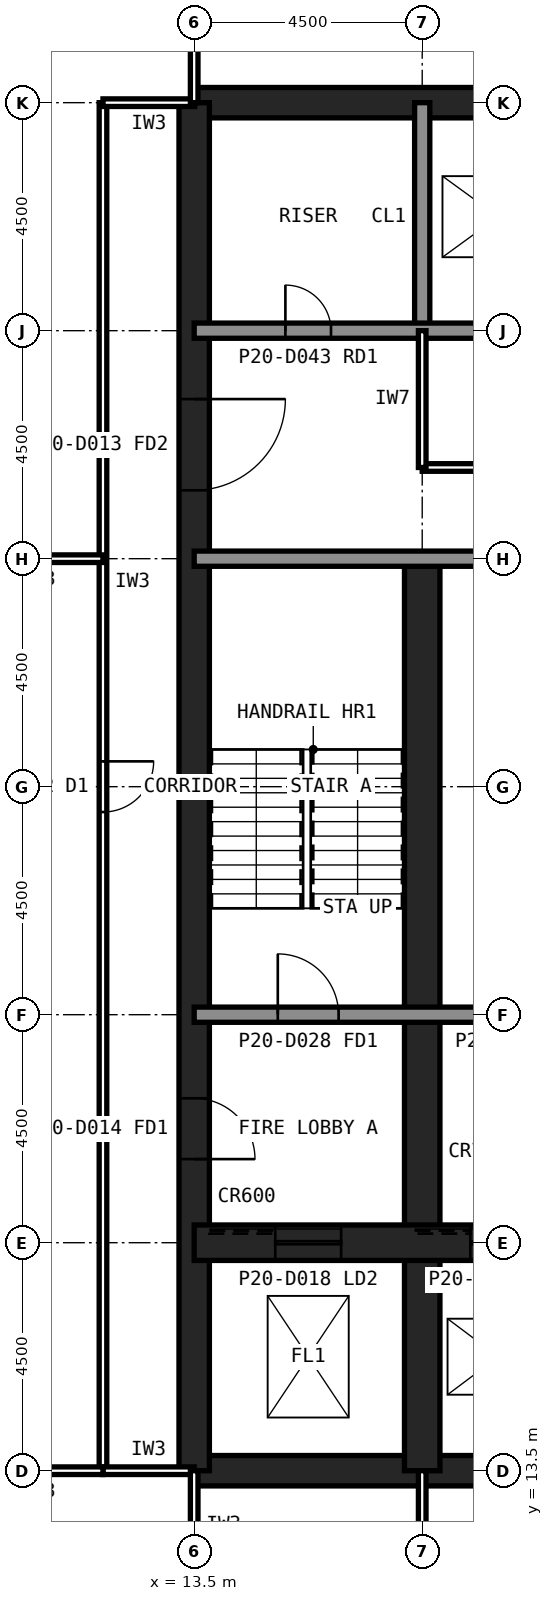
"""IFC4 building model, lengths in metres.
Left out: names, types, materials, properties, quantities, classifications, styles, units other than length and angle.
Written with IfcOpenShell. Run it as: python <this file> out.ifc"""

import sys

from ifc_helpers import new_model, si_unit, direction, frame, frame_2d, origin, place, context, subcontext, project, spatial, rectangle, extrude, element, fill, save


model = new_model("IFC4")
c1 = context("Model", 3, precision=1e-05, world=origin(), true_north=direction((0.0, 1.0)))
c2 = subcontext(c1, "Body", "Model", "MODEL_VIEW")
j1 = project(units=[si_unit("LENGTHUNIT", "METRE"), si_unit("PLANEANGLEUNIT", "RADIAN")], contexts=[c1])
p1 = place(None, origin())
s1 = spatial("IfcSite", under=j1, at=p1, CompositionType="ELEMENT")
p2 = place(p1, origin())
s2 = spatial("IfcBuilding", under=s1, at=p2, CompositionType="ELEMENT")
p3 = place(p2, frame((0.0, 0.0, 87.8)))
s3 = spatial("IfcBuildingStorey", under=s2, at=p3, CompositionType="ELEMENT", Elevation=87.8)
for number, where, z_axis, x_axis in (
    (1, (13.5, 13.5, 0.0), (0.0, 0.0, 1.0), (1.0, 0.0, 0.0)),
    (2, (40.5, 40.5, 0.0), (0.0, 0.0, 1.0), (-1.0, 0.0, 0.0)),
):
    element("IfcWall", number, at=place(p3, frame(where, z_axis=z_axis, x_axis=x_axis)), inside=s3, PredefinedType="SHEAR", context=c2, shape_type="SweptSolid", body=[
        extrude(rectangle(XDim=27.0, YDim=0.6, at=frame_2d((13.5, 0.0))), origin(), (0.0, 0.0, 1.0), 4.2),
    ])
p4 = place(p3, frame((13.5, 40.5, 0.0), z_axis=(0.0, 0.0, 1.0), x_axis=(0.0, -1.0, 0.0)))
e3 = element("IfcWall", 3, at=p4, inside=s3, PredefinedType="SHEAR", context=c2, shape_type="SweptSolid", body=[
    extrude(rectangle(XDim=27.0, YDim=0.6, at=frame_2d((13.5, 0.0))), origin(), (0.0, 0.0, 1.0), 4.2),
])
p5 = place(p4, frame((19.65, 0.0, 0.0)))
e4 = element("IfcOpeningElement", 4, at=p5, cuts=e3, PredefinedType="OPENING", context=c2, shape_type="SweptSolid", body=[
    extrude(rectangle(XDim=1.2, YDim=2.1, at=frame_2d((0.6, 1.05))), frame((0.0, 0.31, 0.0), z_axis=(0.0, -1.0, 0.0), x_axis=(1.0, 0.0, 0.0)), (0.0, 0.0, 1.0), 0.62),
])
p6 = place(p4, frame((5.85, 0.0, 0.0)))
e5 = element("IfcOpeningElement", 5, at=p6, cuts=e3, PredefinedType="OPENING", context=c2, shape_type="SweptSolid", body=[
    extrude(rectangle(XDim=1.8, YDim=2.1, at=frame_2d((0.9, 1.05))), frame((0.0, 0.31, 0.0), z_axis=(0.0, -1.0, 0.0), x_axis=(1.0, 0.0, 0.0)), (0.0, 0.0, 1.0), 0.62),
])
p7 = place(p3, frame((18.0, 13.5, 0.0), z_axis=(0.0, 0.0, 1.0), x_axis=(0.0, 1.0, 0.0)))
e6 = element("IfcWall", 6, at=p7, inside=s3, PredefinedType="SHEAR", context=c2, shape_type="SweptSolid", body=[
    extrude(rectangle(XDim=18.0, YDim=0.7, at=frame_2d((9.0, 0.0))), origin(), (0.0, 0.0, 1.0), 4.2),
])
p8 = place(p3, frame((18.0, 36.0, 0.0), z_axis=(0.0, 0.0, 1.0), x_axis=(0.0, 1.0, 0.0)))
e7 = element("IfcWall", 7, at=p8, inside=s3, PredefinedType="SOLIDWALL", context=c2, shape_type="SweptSolid", body=[
    extrude(rectangle(XDim=4.5, YDim=0.3, at=frame_2d((2.25, 0.0))), origin(), (0.0, 0.0, 1.0), 4.04),
])
p9 = place(p3, frame((13.5, 18.0, 0.0), z_axis=(0.0, 0.0, 1.0), x_axis=(1.0, 0.0, 0.0)))
e8 = element("IfcWall", 8, at=p9, inside=s3, PredefinedType="SHEAR", context=c2, shape_type="SweptSolid", body=[
    extrude(rectangle(XDim=27.0, YDim=0.7, at=frame_2d((13.5, 0.0))), origin(), (0.0, 0.0, 1.0), 4.2),
])
p10 = place(p9, frame((24.3, 0.0, 0.0)))
e9 = element("IfcOpeningElement", 9, at=p10, cuts=e8, PredefinedType="OPENING", context=c2, shape_type="SweptSolid", body=[
    extrude(rectangle(XDim=0.9, YDim=2.1, at=frame_2d((0.45, 1.05))), frame((0.0, 0.36, 0.0), z_axis=(0.0, -1.0, 0.0), x_axis=(1.0, 0.0, 0.0)), (0.0, 0.0, 1.0), 0.72),
])
p11 = place(p9, frame((5.45, 0.0, 0.0)))
e10 = element("IfcOpeningElement", 10, at=p11, cuts=e8, PredefinedType="OPENING", context=c2, shape_type="SweptSolid", body=[
    extrude(rectangle(XDim=1.1, YDim=2.1, at=frame_2d((0.55, 1.05))), frame((0.0, 0.36, 0.0), z_axis=(0.0, -1.0, 0.0), x_axis=(1.0, 0.0, 0.0)), (0.0, 0.0, 1.0), 0.72),
])
p12 = place(p9, frame((8.45, 0.0, 0.0)))
e11 = element("IfcOpeningElement", 11, at=p12, cuts=e8, PredefinedType="OPENING", context=c2, shape_type="SweptSolid", body=[
    extrude(rectangle(XDim=1.1, YDim=2.1, at=frame_2d((0.55, 1.05))), frame((0.0, 0.36, 0.0), z_axis=(0.0, -1.0, 0.0), x_axis=(1.0, 0.0, 0.0)), (0.0, 0.0, 1.0), 0.72),
])
p13 = place(p9, frame((11.45, 0.0, 0.0)))
e12 = element("IfcOpeningElement", 12, at=p13, cuts=e8, PredefinedType="OPENING", context=c2, shape_type="SweptSolid", body=[
    extrude(rectangle(XDim=1.1, YDim=2.1, at=frame_2d((0.55, 1.05))), frame((0.0, 0.36, 0.0), z_axis=(0.0, -1.0, 0.0), x_axis=(1.0, 0.0, 0.0)), (0.0, 0.0, 1.0), 0.72),
])
p14 = place(p9, frame((14.45, 0.0, 0.0)))
e13 = element("IfcOpeningElement", 13, at=p14, cuts=e8, PredefinedType="OPENING", context=c2, shape_type="SweptSolid", body=[
    extrude(rectangle(XDim=1.1, YDim=2.1, at=frame_2d((0.55, 1.05))), frame((0.0, 0.36, 0.0), z_axis=(0.0, -1.0, 0.0), x_axis=(1.0, 0.0, 0.0)), (0.0, 0.0, 1.0), 0.72),
])
p15 = place(p9, frame((17.45, 0.0, 0.0)))
e14 = element("IfcOpeningElement", 14, at=p15, cuts=e8, PredefinedType="OPENING", context=c2, shape_type="SweptSolid", body=[
    extrude(rectangle(XDim=1.1, YDim=2.1, at=frame_2d((0.55, 1.05))), frame((0.0, 0.36, 0.0), z_axis=(0.0, -1.0, 0.0), x_axis=(1.0, 0.0, 0.0)), (0.0, 0.0, 1.0), 0.72),
])
p16 = place(p9, frame((20.45, 0.0, 0.0)))
e15 = element("IfcOpeningElement", 15, at=p16, cuts=e8, PredefinedType="OPENING", context=c2, shape_type="SweptSolid", body=[
    extrude(rectangle(XDim=1.1, YDim=2.1, at=frame_2d((0.55, 1.05))), frame((0.0, 0.36, 0.0), z_axis=(0.0, -1.0, 0.0), x_axis=(1.0, 0.0, 0.0)), (0.0, 0.0, 1.0), 0.72),
])
p17 = place(p9, frame((1.6, 0.0, 0.0)))
e16 = element("IfcOpeningElement", 16, at=p17, cuts=e8, PredefinedType="OPENING", context=c2, shape_type="SweptSolid", body=[
    extrude(rectangle(XDim=1.3, YDim=2.2, at=frame_2d((0.65, 1.1))), frame((0.0, 0.36, 0.0), z_axis=(0.0, -1.0, 0.0), x_axis=(1.0, 0.0, 0.0)), (0.0, 0.0, 1.0), 0.72),
])
p18 = place(p3, frame((13.5, 36.0, 0.0), z_axis=(0.0, 0.0, 1.0), x_axis=(1.0, 0.0, 0.0)))
e17 = element("IfcWall", 17, at=p18, inside=s3, PredefinedType="SOLIDWALL", context=c2, shape_type="SweptSolid", body=[
    extrude(rectangle(XDim=27.0, YDim=0.3, at=frame_2d((13.5, 0.0))), origin(), (0.0, 0.0, 1.0), 4.04),
])
p19 = place(p18, frame((1.8, 0.0, 0.0)))
e18 = element("IfcOpeningElement", 18, at=p19, cuts=e17, PredefinedType="OPENING", context=c2, shape_type="SweptSolid", body=[
    extrude(rectangle(XDim=0.9, YDim=2.1, at=frame_2d((0.45, 1.05))), frame((0.0, 0.16, 0.0), z_axis=(0.0, -1.0, 0.0), x_axis=(1.0, 0.0, 0.0)), (0.0, 0.0, 1.0), 0.32),
])
p20 = place(p18, frame((24.1, 0.0, 0.0)))
e19 = element("IfcOpeningElement", 19, at=p20, cuts=e17, PredefinedType="OPENING", context=c2, shape_type="SweptSolid", body=[
    extrude(rectangle(XDim=1.3, YDim=2.2, at=frame_2d((0.65, 1.1))), frame((0.0, 0.16, 0.0), z_axis=(0.0, -1.0, 0.0), x_axis=(1.0, 0.0, 0.0)), (0.0, 0.0, 1.0), 0.32),
])
p21 = place(p3, frame((13.5, 22.5, 0.0), z_axis=(0.0, 0.0, 1.0), x_axis=(1.0, 0.0, 0.0)))
e20 = element("IfcWall", 20, at=p21, inside=s3, PredefinedType="SOLIDWALL", context=c2, shape_type="SweptSolid", body=[
    extrude(rectangle(XDim=27.0, YDim=0.3, at=frame_2d((13.5, 0.0))), origin(), (0.0, 0.0, 1.0), 4.04),
])
p22 = place(p21, frame((1.65, 0.0, 0.0)))
e21 = element("IfcOpeningElement", 21, at=p22, cuts=e20, PredefinedType="OPENING", context=c2, shape_type="SweptSolid", body=[
    extrude(rectangle(XDim=1.2, YDim=2.1, at=frame_2d((0.6, 1.05))), frame((0.0, 0.16, 0.0), z_axis=(0.0, -1.0, 0.0), x_axis=(1.0, 0.0, 0.0)), (0.0, 0.0, 1.0), 0.32),
])
p23 = place(p21, frame((6.025, 0.0, 0.0)))
e22 = element("IfcOpeningElement", 22, at=p23, cuts=e20, PredefinedType="OPENING", context=c2, shape_type="SweptSolid", body=[
    extrude(rectangle(XDim=1.0, YDim=2.1, at=frame_2d((0.5, 1.05))), frame((0.0, 0.16, 0.0), z_axis=(0.0, -1.0, 0.0), x_axis=(1.0, 0.0, 0.0)), (0.0, 0.0, 1.0), 0.32),
])
p24 = place(p21, frame((10.525, 0.0, 0.0)))
e23 = element("IfcOpeningElement", 23, at=p24, cuts=e20, PredefinedType="OPENING", context=c2, shape_type="SweptSolid", body=[
    extrude(rectangle(XDim=1.0, YDim=2.1, at=frame_2d((0.5, 1.05))), frame((0.0, 0.16, 0.0), z_axis=(0.0, -1.0, 0.0), x_axis=(1.0, 0.0, 0.0)), (0.0, 0.0, 1.0), 0.32),
])
p25 = place(p21, frame((19.75, 0.0, 0.0)))
e24 = element("IfcOpeningElement", 24, at=p25, cuts=e20, PredefinedType="OPENING", context=c2, shape_type="SweptSolid", body=[
    extrude(rectangle(XDim=1.0, YDim=2.1, at=frame_2d((0.5, 1.05))), frame((0.0, 0.16, 0.0), z_axis=(0.0, -1.0, 0.0), x_axis=(1.0, 0.0, 0.0)), (0.0, 0.0, 1.0), 0.32),
])
p26 = place(p21, frame((15.05, 0.0, 0.0)))
e25 = element("IfcOpeningElement", 25, at=p26, cuts=e20, PredefinedType="OPENING", context=c2, shape_type="SweptSolid", body=[
    extrude(rectangle(XDim=1.4, YDim=2.4, at=frame_2d((0.7, 1.2))), frame((0.0, 0.16, 0.0), z_axis=(0.0, -1.0, 0.0), x_axis=(1.0, 0.0, 0.0)), (0.0, 0.0, 1.0), 0.32),
])
p27 = place(p3, frame((13.5, 31.5, 0.0), z_axis=(0.0, 0.0, 1.0), x_axis=(1.0, 0.0, 0.0)))
e26 = element("IfcWall", 26, at=p27, inside=s3, PredefinedType="SOLIDWALL", context=c2, shape_type="SweptSolid", body=[
    extrude(rectangle(XDim=27.0, YDim=0.3, at=frame_2d((13.5, 0.0))), origin(), (0.0, 0.0, 1.0), 4.04),
])
p28 = place(p27, frame((24.15, 0.0, 0.0)))
e27 = element("IfcOpeningElement", 27, at=p28, cuts=e26, PredefinedType="OPENING", context=c2, shape_type="SweptSolid", body=[
    extrude(rectangle(XDim=1.2, YDim=2.1, at=frame_2d((0.6, 1.05))), frame((0.0, 0.16, 0.0), z_axis=(0.0, -1.0, 0.0), x_axis=(1.0, 0.0, 0.0)), (0.0, 0.0, 1.0), 0.32),
])
p29 = place(p27, frame((15.3, 0.0, 0.0)))
e28 = element("IfcOpeningElement", 28, at=p29, cuts=e26, PredefinedType="OPENING", context=c2, shape_type="SweptSolid", body=[
    extrude(rectangle(XDim=0.9, YDim=2.1, at=frame_2d((0.45, 1.05))), frame((0.0, 0.16, 0.0), z_axis=(0.0, -1.0, 0.0), x_axis=(1.0, 0.0, 0.0)), (0.0, 0.0, 1.0), 0.32),
])
p30 = place(p27, frame((19.8, 0.0, 0.0)))
e29 = element("IfcOpeningElement", 29, at=p30, cuts=e26, PredefinedType="OPENING", context=c2, shape_type="SweptSolid", body=[
    extrude(rectangle(XDim=0.9, YDim=2.1, at=frame_2d((0.45, 1.05))), frame((0.0, 0.16, 0.0), z_axis=(0.0, -1.0, 0.0), x_axis=(1.0, 0.0, 0.0)), (0.0, 0.0, 1.0), 0.32),
])
p31 = place(p3, frame((18.0, 33.3, 0.0), z_axis=(0.0, 0.0, 1.0), x_axis=(1.0, 0.0, 0.0)))
e30 = element("IfcWall", 30, at=p31, inside=s3, PredefinedType="PARTITIONING", context=c2, shape_type="SweptSolid", body=[
    extrude(rectangle(XDim=12.0, YDim=0.15, at=frame_2d((6.0, 0.0))), origin(), (0.0, 0.0, 1.0), 4.04),
])
p32 = place(p31, frame((2.55, 0.0, 0.0)))
e31 = element("IfcOpeningElement", 31, at=p32, cuts=e30, PredefinedType="OPENING", context=c2, shape_type="SweptSolid", body=[
    extrude(rectangle(XDim=0.9, YDim=2.1, at=frame_2d((0.45, 1.05))), frame((0.0, 0.085, 0.0), z_axis=(0.0, -1.0, 0.0), x_axis=(1.0, 0.0, 0.0)), (0.0, 0.0, 1.0), 0.17),
])
p33 = place(p31, frame((8.55, 0.0, 0.0)))
e32 = element("IfcOpeningElement", 32, at=p33, cuts=e30, PredefinedType="OPENING", context=c2, shape_type="SweptSolid", body=[
    extrude(rectangle(XDim=0.9, YDim=2.1, at=frame_2d((0.45, 1.05))), frame((0.0, 0.085, 0.0), z_axis=(0.0, -1.0, 0.0), x_axis=(1.0, 0.0, 0.0)), (0.0, 0.0, 1.0), 0.17),
])
p34 = place(p3, frame((18.0, 33.3, 0.0), z_axis=(0.0, 0.0, 1.0), x_axis=(0.0, 1.0, 0.0)))
e33 = element("IfcWall", 33, at=p34, inside=s3, PredefinedType="PARTITIONING", context=c2, shape_type="SweptSolid", body=[
    extrude(rectangle(XDim=2.7, YDim=0.15, at=frame_2d((1.35, 0.0))), origin(), (0.0, 0.0, 1.0), 4.04),
])
p35 = place(p3, frame((11.7, 40.5, 0.0), z_axis=(0.0, 0.0, 1.0), x_axis=(0.0, -1.0, 0.0)))
e34 = element("IfcWall", 34, at=p35, inside=s3, PredefinedType="PARTITIONING", context=c2, shape_type="SweptSolid", body=[
    extrude(rectangle(XDim=27.0, YDim=0.15, at=frame_2d((13.5, 0.0))), origin(), (0.0, 0.0, 1.0), 4.04),
])
p36 = place(p35, frame((13.0, 0.0, 0.0)))
e35 = element("IfcOpeningElement", 35, at=p36, cuts=e34, PredefinedType="OPENING", context=c2, shape_type="SweptSolid", body=[
    extrude(rectangle(XDim=1.0, YDim=2.1, at=frame_2d((0.5, 1.05))), frame((0.0, 0.085, 0.0), z_axis=(0.0, -1.0, 0.0), x_axis=(1.0, 0.0, 0.0)), (0.0, 0.0, 1.0), 0.17),
])
p37 = place(p3, frame((13.51, 40.5, 0.0), z_axis=(0.0, 0.0, 1.0), x_axis=(-1.0, 0.0, 0.0)))
e36 = element("IfcWall", 36, at=p37, inside=s3, PredefinedType="PARTITIONING", context=c2, shape_type="SweptSolid", body=[
    extrude(rectangle(XDim=1.81, YDim=0.15, at=frame_2d((0.905, 0.0))), origin(), (0.0, 0.0, 1.0), 3.189),
])
p38 = place(p3, frame((11.7, 13.5, 0.0), z_axis=(0.0, 0.0, 1.0), x_axis=(1.0, 0.0, 0.0)))
e37 = element("IfcWall", 37, at=p38, inside=s3, PredefinedType="PARTITIONING", context=c2, shape_type="SweptSolid", body=[
    extrude(rectangle(XDim=1.8, YDim=0.15, at=frame_2d((0.9, 0.0))), origin(), (0.0, 0.0, 1.0), 3.189),
])
p39 = place(p3, frame((18.0, 8.1, 0.0), z_axis=(0.0, 0.0, 1.0), x_axis=(0.0, 1.0, 0.0)))
e38 = element("IfcWall", 38, at=p39, inside=s3, PredefinedType="PARTITIONING", context=c2, shape_type="SweptSolid", body=[
    extrude(rectangle(XDim=5.4, YDim=0.15, at=frame_2d((2.7, 0.0))), origin(), (0.0, 0.0, 1.0), 3.189),
])
p40 = place(p3, frame((13.5, 13.5, 0.0), z_axis=(0.0, 0.0, 1.0), x_axis=(0.0, -1.0, 0.0)))
e39 = element("IfcWall", 39, at=p40, inside=s3, PredefinedType="PARTITIONING", context=c2, shape_type="SweptSolid", body=[
    extrude(rectangle(XDim=5.4, YDim=0.15, at=frame_2d((2.7, 0.0))), origin(), (0.0, 0.0, 1.0), 3.189),
])
p41 = place(p40, frame((2.2, 0.0, 0.0)))
e40 = element("IfcOpeningElement", 40, at=p41, cuts=e39, PredefinedType="OPENING", context=c2, shape_type="SweptSolid", body=[
    extrude(rectangle(XDim=1.0, YDim=2.1, at=frame_2d((0.5, 1.05))), frame((0.0, 0.085, 0.0), z_axis=(0.0, -1.0, 0.0), x_axis=(1.0, 0.0, 0.0)), (0.0, 0.0, 1.0), 0.17),
])
p42 = place(p3, frame((13.5, 40.5, 0.0), z_axis=(0.0, 0.0, 1.0), x_axis=(0.0, 1.0, 0.0)))
e41 = element("IfcWall", 41, at=p42, inside=s3, PredefinedType="PARTITIONING", context=c2, shape_type="SweptSolid", body=[
    extrude(rectangle(XDim=13.055, YDim=0.15, at=frame_2d((6.527, 0.0))), origin(), (0.0, 0.0, 1.0), 3.189),
])
p43 = place(p42, frame((6.028, 0.0, 0.0)))
e42 = element("IfcOpeningElement", 42, at=p43, cuts=e41, PredefinedType="OPENING", context=c2, shape_type="SweptSolid", body=[
    extrude(rectangle(XDim=1.0, YDim=2.1, at=frame_2d((0.5, 1.05))), frame((0.0, 0.085, 0.0), z_axis=(0.0, -1.0, 0.0), x_axis=(1.0, 0.0, 0.0)), (0.0, 0.0, 1.0), 0.17),
])
p44 = place(p3, frame((11.7, 31.5, 0.0), z_axis=(0.0, 0.0, 1.0), x_axis=(-1.0, 0.0, 0.0)))
e43 = element("IfcWall", 43, at=p44, inside=s3, PredefinedType="PARTITIONING", context=c2, shape_type="SweptSolid", body=[
    extrude(rectangle(XDim=6.3, YDim=0.15, at=frame_2d((3.15, 0.0))), origin(), (0.0, 0.0, 1.0), 3.189),
])
p45 = place(p44, frame((2.65, 0.0, 0.0)))
e44 = element("IfcOpeningElement", 44, at=p45, cuts=e43, PredefinedType="OPENING", context=c2, shape_type="SweptSolid", body=[
    extrude(rectangle(XDim=1.0, YDim=2.1, at=frame_2d((0.5, 1.05))), frame((0.0, 0.085, 0.0), z_axis=(0.0, -1.0, 0.0), x_axis=(1.0, 0.0, 0.0)), (0.0, 0.0, 1.0), 0.17),
])
p46 = place(p3, frame((11.7, 13.5, 0.0), z_axis=(0.0, 0.0, 1.0), x_axis=(-1.0, 0.0, 0.0)))
e45 = element("IfcWall", 45, at=p46, inside=s3, PredefinedType="PARTITIONING", context=c2, shape_type="SweptSolid", body=[
    extrude(rectangle(XDim=6.3, YDim=0.15, at=frame_2d((3.15, 0.0))), origin(), (0.0, 0.0, 1.0), 3.189),
])
p47 = place(p46, frame((2.65, 0.0, 0.0)))
e46 = element("IfcOpeningElement", 46, at=p47, cuts=e45, PredefinedType="OPENING", context=c2, shape_type="SweptSolid", body=[
    extrude(rectangle(XDim=1.0, YDim=2.1, at=frame_2d((0.5, 1.05))), frame((0.0, 0.085, 0.0), z_axis=(0.0, -1.0, 0.0), x_axis=(1.0, 0.0, 0.0)), (0.0, 0.0, 1.0), 0.17),
])
p48 = place(p5, origin())
e47 = element("IfcDoor", 47, at=p48, inside=s3, OperationType="SINGLE_SWING_RIGHT", PredefinedType="DOOR", context=c2, shape_type="SweptSolid", body=[
    extrude(rectangle(XDim=1.2, YDim=2.1, at=frame_2d((0.6, 1.05))), frame((0.0, 0.025, 0.0), z_axis=(0.0, -1.0, 0.0), x_axis=(1.0, 0.0, 0.0)), (0.0, 0.0, 1.0), 0.05),
])
fill(e4, e47)
p49 = place(p6, origin())
e48 = element("IfcDoor", 48, at=p49, inside=s3, OperationType="SINGLE_SWING_LEFT", PredefinedType="DOOR", context=c2, shape_type="SweptSolid", body=[
    extrude(rectangle(XDim=1.8, YDim=2.1, at=frame_2d((0.9, 1.05))), frame((0.0, 0.025, 0.0), z_axis=(0.0, -1.0, 0.0), x_axis=(1.0, 0.0, 0.0)), (0.0, 0.0, 1.0), 0.05),
])
fill(e5, e48)
p50 = place(p22, origin())
e49 = element("IfcDoor", 49, at=p50, inside=s3, OperationType="SINGLE_SWING_LEFT", PredefinedType="DOOR", context=c2, shape_type="SweptSolid", body=[
    extrude(rectangle(XDim=1.2, YDim=2.1, at=frame_2d((0.6, 1.05))), frame((0.0, 0.025, 0.0), z_axis=(0.0, -1.0, 0.0), x_axis=(1.0, 0.0, 0.0)), (0.0, 0.0, 1.0), 0.05),
])
fill(e21, e49)
p51 = place(p19, origin())
e50 = element("IfcDoor", 50, at=p51, inside=s3, OperationType="SINGLE_SWING_LEFT", PredefinedType="DOOR", context=c2, shape_type="SweptSolid", body=[
    extrude(rectangle(XDim=0.9, YDim=2.1, at=frame_2d((0.45, 1.05))), frame((0.0, 0.025, 0.0), z_axis=(0.0, -1.0, 0.0), x_axis=(1.0, 0.0, 0.0)), (0.0, 0.0, 1.0), 0.05),
])
fill(e18, e50)
p52 = place(p11, origin())
e51 = element("IfcDoor", 51, at=p52, inside=s3, OperationType="SLIDING_TO_LEFT", PredefinedType="DOOR", context=c2, shape_type="SweptSolid", body=[
    extrude(rectangle(XDim=1.1, YDim=2.1, at=frame_2d((0.55, 1.05))), frame((0.0, 0.025, 0.0), z_axis=(0.0, -1.0, 0.0), x_axis=(1.0, 0.0, 0.0)), (0.0, 0.0, 1.0), 0.05),
])
fill(e10, e51)
p53 = place(p17, origin())
e52 = element("IfcDoor", 52, at=p53, inside=s3, OperationType="SLIDING_TO_LEFT", PredefinedType="DOOR", context=c2, shape_type="SweptSolid", body=[
    extrude(rectangle(XDim=1.3, YDim=2.2, at=frame_2d((0.65, 1.1))), frame((0.0, 0.025, 0.0), z_axis=(0.0, -1.0, 0.0), x_axis=(1.0, 0.0, 0.0)), (0.0, 0.0, 1.0), 0.05),
])
fill(e16, e52)
p54 = place(p36, origin())
e53 = element("IfcDoor", 53, at=p54, inside=s3, OperationType="SINGLE_SWING_LEFT", PredefinedType="DOOR", context=c2, shape_type="SweptSolid", body=[
    extrude(rectangle(XDim=1.0, YDim=2.1, at=frame_2d((0.5, 1.05))), frame((0.0, 0.025, 0.0), z_axis=(0.0, -1.0, 0.0), x_axis=(1.0, 0.0, 0.0)), (0.0, 0.0, 1.0), 0.05),
])
fill(e35, e53)
save(model, sys.argv[1])
